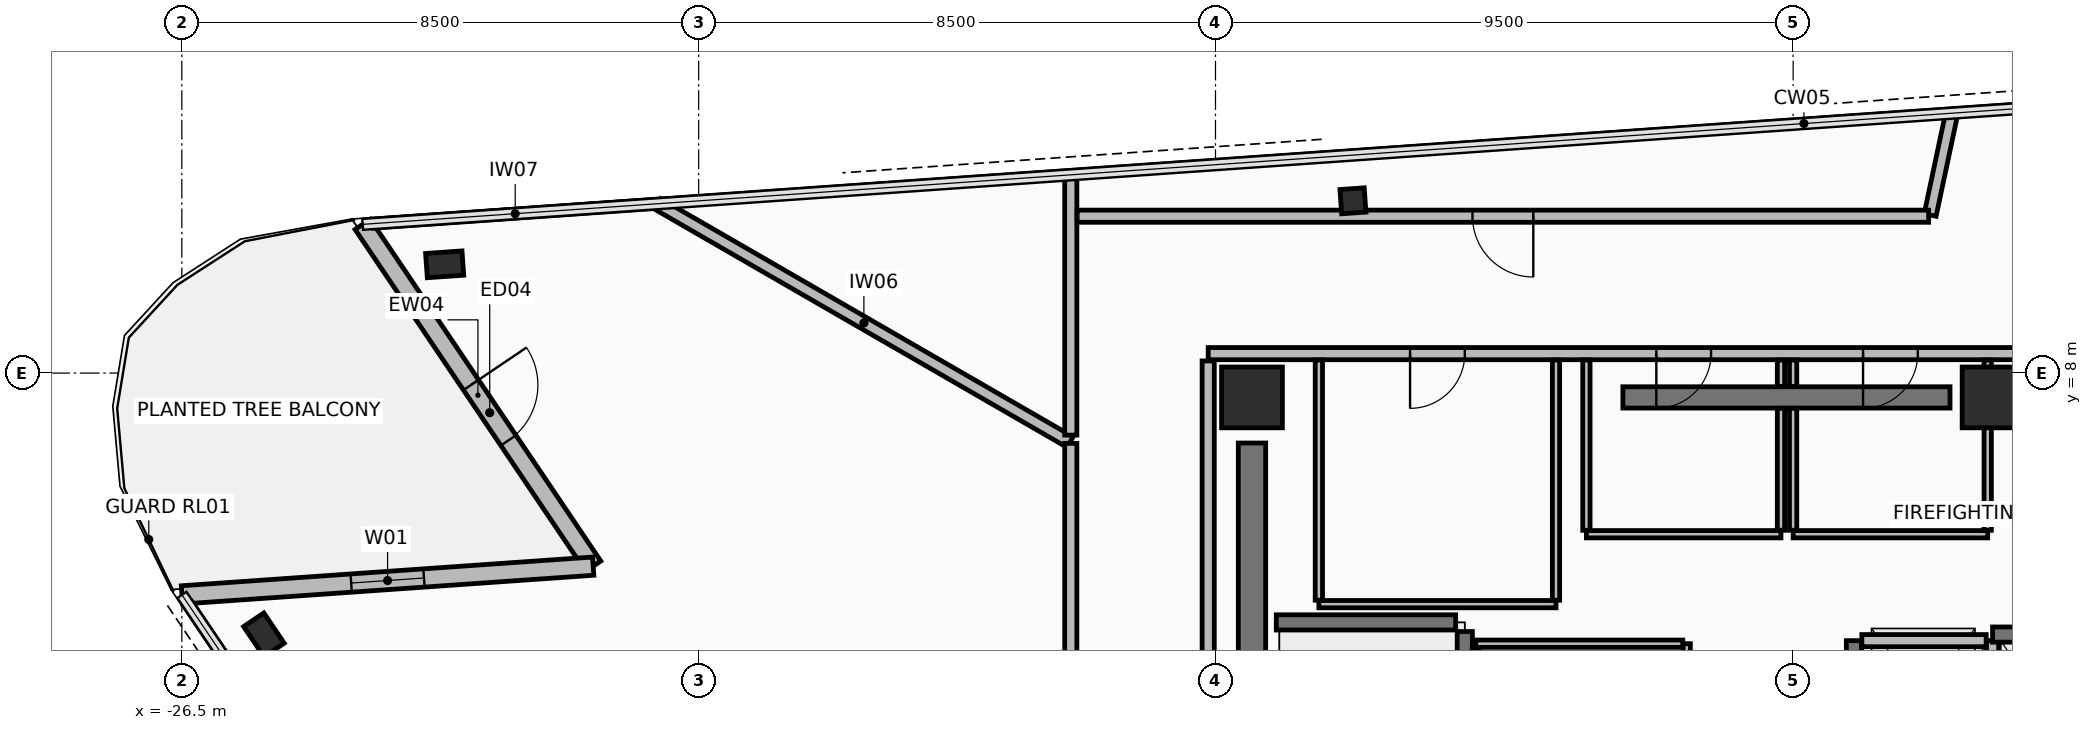
"""IFC4 building model, lengths in metres.
Left out: names, types, materials, properties, quantities, classifications, styles, units other than length and angle.
Written with IfcOpenShell. Run it as: python <this file> out.ifc"""

import sys

from ifc_helpers import new_model, si_unit, direction, frame, frame_2d, origin, origin_2d, place, context, subcontext, project, spatial, rectangle, hollow_rectangle, extrude, element, fill, save


model = new_model("IFC4")
c1 = context("Model", 3, precision=1e-05, world=origin(), true_north=direction((0.0, 1.0)))
c2 = subcontext(c1, "Body", "Model", "MODEL_VIEW")
j1 = project(units=[si_unit("LENGTHUNIT", "METRE"), si_unit("PLANEANGLEUNIT", "RADIAN")], contexts=[c1])
p1 = place(None, origin())
s1 = spatial("IfcSite", under=j1, at=p1, CompositionType="ELEMENT")
p2 = place(p1, origin())
s2 = spatial("IfcBuilding", under=s1, at=p2, CompositionType="ELEMENT")
p3 = place(p2, frame((0.0, 0.0, 271.4)))
s3 = spatial("IfcBuildingStorey", under=s2, at=p3, CompositionType="ELEMENT", Elevation=271.4)
for number, where, z_axis, x_axis in (
    (1, (3.28, 7.6, 0.0), (0.0, 0.0, 1.0), (1.0, 0.0, 0.0)),
    (2, (-8.9, 7.6, 0.0), (0.0, 0.0, 1.0), (1.0, 0.0, 0.0)),
):
    element("IfcColumn", number, at=place(p3, frame(where, z_axis=z_axis, x_axis=x_axis)), inside=s3, PredefinedType="COLUMN", context=c2, shape_type="SweptSolid", body=[
        extrude(rectangle(XDim=1.0, YDim=1.0, at=origin_2d()), origin(), (0.0, 0.0, 1.0), 3.6),
    ])
p4 = place(p3, frame((-25.15, 3.695, 0.0), z_axis=(0.0, 0.0, 1.0), x_axis=(-0.559192903471, 0.829037572555, 0.0)))
e3 = element("IfcColumn", 3, at=p4, inside=s3, PredefinedType="COLUMN", context=c2, shape_type="SweptSolid", body=[
    extrude(hollow_rectangle(XDim=0.4, YDim=0.6, WallThickness=0.03, at=origin_2d()), origin(), (0.0, 0.0, 1.0), 3.6),
])
p5 = place(p3, frame((-7.24, 10.833, 0.0), z_axis=(0.0, 0.0, 1.0), x_axis=(0.99756392851, 0.069758214822, 0.0)))
e4 = element("IfcColumn", 4, at=p5, inside=s3, PredefinedType="COLUMN", context=c2, shape_type="SweptSolid", body=[
    extrude(hollow_rectangle(XDim=0.4, YDim=0.4, WallThickness=0.025, at=origin_2d()), origin(), (0.0, 0.0, 1.0), 3.6),
])
p6 = place(p3, frame((-22.177, 9.789, 0.0), z_axis=(0.0, 0.0, 1.0), x_axis=(0.99756392851, 0.069758214822, 0.0)))
e5 = element("IfcColumn", 5, at=p6, inside=s3, PredefinedType="COLUMN", context=c2, shape_type="SweptSolid", body=[
    extrude(hollow_rectangle(XDim=0.4, YDim=0.6, WallThickness=0.03, at=origin_2d()), origin(), (0.0, 0.0, 1.0), 3.6),
])
p7 = place(p3, frame((-23.526, 10.446, 0.0), z_axis=(0.0, 0.0, 1.0), x_axis=(0.559187716425, -0.829041071238, 0.0)))
e6 = element("IfcWall", 6, at=p7, inside=s3, PredefinedType="STANDARD", context=c2, shape_type="SweptSolid", body=[
    extrude(rectangle(XDim=6.78, YDim=0.3, at=frame_2d((3.39, 0.0))), origin(), (0.0, 0.0, 1.0), 2.765),
])
p8 = place(p7, frame((3.186, 0.0, 0.0)))
e7 = element("IfcOpeningElement", 7, at=p8, cuts=e6, PredefinedType="OPENING", context=c2, shape_type="SweptSolid", body=[
    extrude(rectangle(XDim=1.1, YDim=2.2, at=frame_2d((0.55, 1.1))), frame((0.0, 0.16, 0.0), z_axis=(0.0, -1.0, 0.0), x_axis=(1.0, 0.0, 0.0)), (0.0, 0.0, 1.0), 0.32),
])
p9 = place(p3, frame((-19.735, 4.825, 0.0), z_axis=(0.0, 0.0, 1.0), x_axis=(-0.997564507468, -0.06974993506, 0.0)))
e8 = element("IfcWall", 8, at=p9, inside=s3, PredefinedType="STANDARD", context=c2, shape_type="SweptSolid", body=[
    extrude(rectangle(XDim=6.78, YDim=0.3, at=frame_2d((3.39, 0.0))), origin(), (0.0, 0.0, 1.0), 2.765),
])
p10 = place(p9, frame((2.79, 0.0, 0.485)))
e9 = element("IfcOpeningElement", 9, at=p10, cuts=e8, PredefinedType="OPENING", context=c2, shape_type="SweptSolid", body=[
    extrude(rectangle(XDim=1.2, YDim=2.1, at=frame_2d((0.6, 1.05))), frame((0.0, 0.16, 0.0), z_axis=(0.0, -1.0, 0.0), x_axis=(1.0, 0.0, 0.0)), (0.0, 0.0, 1.0), 0.32),
])
p11 = place(p3, frame((-2.8, 7.6, 0.0), z_axis=(0.0, 0.0, 1.0), x_axis=(1.0, 0.0, 0.0)))
e10 = element("IfcWall", 10, at=p11, inside=s3, PredefinedType="SHEAR", context=c2, shape_type="SweptSolid", body=[
    extrude(rectangle(XDim=5.38, YDim=0.35, at=frame_2d((2.69, 0.0))), origin(), (0.0, 0.0, 1.0), 3.42),
])
p12 = place(p3, frame((-8.9, -3.85, 0.0), z_axis=(0.0, 0.0, 1.0), x_axis=(0.0, 1.0, 0.0)))
e11 = element("IfcWall", 11, at=p12, inside=s3, PredefinedType="SHEAR", context=c2, shape_type="SweptSolid", body=[
    extrude(rectangle(XDim=10.7, YDim=0.45, at=frame_2d((5.35, 0.0))), origin(), (0.0, 0.0, 1.0), 3.42),
])
p13 = place(p3, frame((9.62, 8.32, 0.0), z_axis=(0.0, 0.0, 1.0), x_axis=(-1.0, 0.0, 0.0)))
e12 = element("IfcWall", 12, at=p13, inside=s3, PredefinedType="PARTITIONING", context=c2, shape_type="SweptSolid", body=[
    extrude(rectangle(XDim=19.24, YDim=0.2, at=frame_2d((9.62, 0.0))), origin(), (0.0, 0.0, 1.0), 2.915),
])
p14 = place(p13, frame((10.97, 0.0, 0.0)))
e13 = element("IfcOpeningElement", 13, at=p14, cuts=e12, PredefinedType="OPENING", context=c2, shape_type="SweptSolid", body=[
    extrude(rectangle(XDim=0.9, YDim=2.1, at=frame_2d((0.45, 1.05))), frame((0.0, 0.11, 0.0), z_axis=(0.0, -1.0, 0.0), x_axis=(1.0, 0.0, 0.0)), (0.0, 0.0, 1.0), 0.22),
])
p15 = place(p13, frame((7.57, 0.0, 0.0)))
e14 = element("IfcOpeningElement", 14, at=p15, cuts=e12, PredefinedType="OPENING", context=c2, shape_type="SweptSolid", body=[
    extrude(rectangle(XDim=0.9, YDim=2.1, at=frame_2d((0.45, 1.05))), frame((0.0, 0.11, 0.0), z_axis=(0.0, -1.0, 0.0), x_axis=(1.0, 0.0, 0.0)), (0.0, 0.0, 1.0), 0.22),
])
p16 = place(p13, frame((15.02, 0.0, 0.0)))
e15 = element("IfcOpeningElement", 15, at=p16, cuts=e12, PredefinedType="OPENING", context=c2, shape_type="SweptSolid", body=[
    extrude(rectangle(XDim=0.9, YDim=2.1, at=frame_2d((0.45, 1.05))), frame((0.0, 0.11, 0.0), z_axis=(0.0, -1.0, 0.0), x_axis=(1.0, 0.0, 0.0)), (0.0, 0.0, 1.0), 0.22),
])
p17 = place(p3, frame((-9.62, 8.2, 0.0), z_axis=(0.0, 0.0, 1.0), x_axis=(0.0, -1.0, 0.0)))
e16 = element("IfcWall", 16, at=p17, inside=s3, PredefinedType="PARTITIONING", context=c2, shape_type="SweptSolid", body=[
    extrude(rectangle(XDim=16.4, YDim=0.2, at=frame_2d((8.2, 0.0))), origin(), (0.0, 0.0, 1.0), 2.765),
])
p18 = place(p17, frame((12.65, 0.0, 0.0)))
e17 = element("IfcOpeningElement", 17, at=p18, cuts=e16, PredefinedType="OPENING", context=c2, shape_type="SweptSolid", body=[
    extrude(rectangle(XDim=1.1, YDim=2.15, at=frame_2d((0.55, 1.075))), frame((0.0, 0.11, 0.0), z_axis=(0.0, -1.0, 0.0), x_axis=(1.0, 0.0, 0.0)), (0.0, 0.0, 1.0), 0.22),
])
p19 = place(p3, frame((-5.4, -3.55, 0.0), z_axis=(0.0, 0.0, 1.0), x_axis=(0.0, 1.0, 0.0)))
e18 = element("IfcWall", 18, at=p19, inside=s3, PredefinedType="SHEAR", context=c2, shape_type="SweptSolid", body=[
    extrude(rectangle(XDim=7.3, YDim=0.25, at=frame_2d((3.65, 0.0))), origin(), (0.0, 0.0, 1.0), 3.42),
])
p20 = place(p3, frame((-8.5, 3.9, 0.0), z_axis=(0.0, 0.0, 1.0), x_axis=(1.0, 0.0, 0.0)))
e19 = element("IfcWall", 19, at=p20, inside=s3, PredefinedType="SHEAR", context=c2, shape_type="SweptSolid", body=[
    extrude(rectangle(XDim=2.95, YDim=0.25, at=frame_2d((1.475, 0.0))), origin(), (0.0, 0.0, 1.0), 3.42),
])
p21 = place(p3, frame((1.0, 1.8, 0.0), z_axis=(0.0, 0.0, 1.0), x_axis=(0.0, 1.0, 0.0)))
e20 = element("IfcWall", 20, at=p21, inside=s3, PredefinedType="SHEAR", context=c2, shape_type="SweptSolid", body=[
    extrude(rectangle(XDim=1.8, YDim=0.25, at=frame_2d((0.9, 0.0))), origin(), (0.0, 0.0, 1.0), 3.42),
])
p22 = place(p21, frame((0.35, 0.0, 0.0)))
e21 = element("IfcOpeningElement", 21, at=p22, cuts=e20, PredefinedType="OPENING", context=c2, shape_type="SweptSolid", body=[
    extrude(rectangle(XDim=1.1, YDim=2.2, at=frame_2d((0.55, 1.1))), frame((0.0, 0.135, 0.0), z_axis=(0.0, -1.0, 0.0), x_axis=(1.0, 0.0, 0.0)), (0.0, 0.0, 1.0), 0.27),
])
p23 = place(p3, frame((3.28, 1.8, 0.0), z_axis=(0.0, 0.0, 1.0), x_axis=(0.0, 1.0, 0.0)))
e22 = element("IfcWall", 22, at=p23, inside=s3, PredefinedType="PARTITIONING", context=c2, shape_type="SweptSolid", body=[
    extrude(rectangle(XDim=1.8, YDim=0.2, at=frame_2d((0.9, 0.0))), origin(), (0.0, 0.0, 1.0), 3.42),
])
p24 = place(p3, frame((1.13, 3.6, 0.0), z_axis=(0.0, 0.0, 1.0), x_axis=(1.0, 0.0, 0.0)))
e23 = element("IfcWall", 23, at=p24, inside=s3, PredefinedType="PARTITIONING", context=c2, shape_type="SweptSolid", body=[
    extrude(rectangle(XDim=2.045, YDim=0.2, at=frame_2d((1.022, 0.0))), origin(), (0.0, 0.0, 1.0), 2.715),
])
p25 = place(p3, frame((3.28, 3.7, 0.0), z_axis=(0.0, 0.0, 1.0), x_axis=(1.0, 0.0, 0.0)))
e24 = element("IfcWall", 24, at=p25, inside=s3, PredefinedType="SHEAR", context=c2, shape_type="SweptSolid", body=[
    extrude(rectangle(XDim=2.07, YDim=0.25, at=frame_2d((1.035, 0.0))), origin(), (0.0, 0.0, 1.0), 3.42),
])
p26 = place(p25, frame((0.435, 0.0, 0.0)))
e25 = element("IfcOpeningElement", 25, at=p26, cuts=e24, PredefinedType="OPENING", context=c2, shape_type="SweptSolid", body=[
    extrude(rectangle(XDim=1.2, YDim=2.2, at=frame_2d((0.6, 1.1))), frame((0.0, 0.135, 0.0), z_axis=(0.0, -1.0, 0.0), x_axis=(1.0, 0.0, 0.0)), (0.0, 0.0, 1.0), 0.27),
])
p27 = place(p3, frame((-1.75, 1.585, 0.0), z_axis=(0.0, 0.0, 1.0), x_axis=(0.0, 1.0, 0.0)))
e26 = element("IfcWall", 26, at=p27, inside=s3, PredefinedType="PARTITIONING", context=c2, shape_type="SweptSolid", body=[
    extrude(rectangle(XDim=1.965, YDim=0.12, at=frame_2d((0.982, 0.0))), origin(), (0.0, 0.0, 1.0), 3.42),
])
p28 = place(p27, frame((0.557, 0.0, 0.0)))
e27 = element("IfcOpeningElement", 27, at=p28, cuts=e26, PredefinedType="OPENING", context=c2, shape_type="SweptSolid", body=[
    extrude(rectangle(XDim=0.85, YDim=2.1, at=frame_2d((0.425, 1.05))), frame((0.0, 0.07, 0.0), z_axis=(0.0, -1.0, 0.0), x_axis=(1.0, 0.0, 0.0)), (0.0, 0.0, 1.0), 0.14),
])
p29 = place(p3, frame((-1.815, 3.55, 0.0), z_axis=(0.0, 0.0, 1.0), x_axis=(-1.0, 0.0, 0.0)))
e28 = element("IfcWall", 28, at=p29, inside=s3, PredefinedType="PARTITIONING", context=c2, shape_type="SweptSolid", body=[
    extrude(rectangle(XDim=3.405, YDim=0.12, at=frame_2d((1.703, 0.0))), origin(), (0.0, 0.0, 1.0), 3.42),
])
p30 = place(p3, frame((-5.22, 3.485, 0.0), z_axis=(0.0, 0.0, 1.0), x_axis=(0.0, -1.0, 0.0)))
e29 = element("IfcWall", 29, at=p30, inside=s3, PredefinedType="PARTITIONING", context=c2, shape_type="SweptSolid", body=[
    extrude(rectangle(XDim=1.9, YDim=0.12, at=frame_2d((0.95, 0.0))), origin(), (0.0, 0.0, 1.0), 3.42),
])
p31 = place(p3, frame((-3.4, 5.35, 0.0), z_axis=(0.0, 0.0, 1.0), x_axis=(1.0, 0.0, 0.0)))
e30 = element("IfcWall", 30, at=p31, inside=s3, PredefinedType="PARTITIONING", context=c2, shape_type="SweptSolid", body=[
    extrude(rectangle(XDim=3.2, YDim=0.12, at=frame_2d((1.6, 0.0))), origin(), (0.0, 0.0, 1.0), 3.42),
])
p32 = place(p3, frame((-0.2, 5.415, 0.0), z_axis=(0.0, 0.0, 1.0), x_axis=(0.0, 1.0, 0.0)))
e31 = element("IfcWall", 31, at=p32, inside=s3, PredefinedType="PARTITIONING", context=c2, shape_type="SweptSolid", body=[
    extrude(rectangle(XDim=2.005, YDim=0.12, at=frame_2d((1.002, 0.0))), origin(), (0.0, 0.0, 1.0), 2.715),
])
p33 = place(p3, frame((-0.2, 7.78, 0.0), z_axis=(0.0, 0.0, 1.0), x_axis=(0.0, 1.0, 0.0)))
e32 = element("IfcWall", 32, at=p33, inside=s3, PredefinedType="PARTITIONING", context=c2, shape_type="SweptSolid", body=[
    extrude(rectangle(XDim=0.435, YDim=0.12, at=frame_2d((0.218, 0.0))), origin(), (0.0, 0.0, 1.0), 2.715),
])
p34 = place(p3, frame((-3.4, 8.215, 0.0), z_axis=(0.0, 0.0, 1.0), x_axis=(0.0, -1.0, 0.0)))
e33 = element("IfcWall", 33, at=p34, inside=s3, PredefinedType="PARTITIONING", context=c2, shape_type="SweptSolid", body=[
    extrude(rectangle(XDim=2.8, YDim=0.12, at=frame_2d((1.4, 0.0))), origin(), (0.0, 0.0, 1.0), 2.715),
])
p35 = place(p3, frame((0.0, 5.35, 0.0), z_axis=(0.0, 0.0, 1.0), x_axis=(1.0, 0.0, 0.0)))
e34 = element("IfcWall", 34, at=p35, inside=s3, PredefinedType="PARTITIONING", context=c2, shape_type="SweptSolid", body=[
    extrude(rectangle(XDim=3.2, YDim=0.12, at=frame_2d((1.6, 0.0))), origin(), (0.0, 0.0, 1.0), 2.715),
])
p36 = place(p3, frame((3.2, 5.415, 0.0), z_axis=(0.0, 0.0, 1.0), x_axis=(0.0, 1.0, 0.0)))
e35 = element("IfcWall", 35, at=p36, inside=s3, PredefinedType="PARTITIONING", context=c2, shape_type="SweptSolid", body=[
    extrude(rectangle(XDim=2.8, YDim=0.12, at=frame_2d((1.4, 0.0))), origin(), (0.0, 0.0, 1.0), 2.715),
])
p37 = place(p3, frame((0.0, 8.215, 0.0), z_axis=(0.0, 0.0, 1.0), x_axis=(0.0, -1.0, 0.0)))
e36 = element("IfcWall", 36, at=p37, inside=s3, PredefinedType="PARTITIONING", context=c2, shape_type="SweptSolid", body=[
    extrude(rectangle(XDim=0.435, YDim=0.12, at=frame_2d((0.218, 0.0))), origin(), (0.0, 0.0, 1.0), 2.715),
])
p38 = place(p3, frame((0.0, 7.42, 0.0), z_axis=(0.0, 0.0, 1.0), x_axis=(0.0, -1.0, 0.0)))
e37 = element("IfcWall", 37, at=p38, inside=s3, PredefinedType="PARTITIONING", context=c2, shape_type="SweptSolid", body=[
    extrude(rectangle(XDim=2.005, YDim=0.12, at=frame_2d((1.002, 0.0))), origin(), (0.0, 0.0, 1.0), 2.715),
])
p39 = place(p3, frame((-7.8, 4.2, 0.0), z_axis=(0.0, 0.0, 1.0), x_axis=(1.0, 0.0, 0.0)))
e38 = element("IfcWall", 38, at=p39, inside=s3, PredefinedType="PARTITIONING", context=c2, shape_type="SweptSolid", body=[
    extrude(rectangle(XDim=3.9, YDim=0.12, at=frame_2d((1.95, 0.0))), origin(), (0.0, 0.0, 1.0), 3.42),
])
for number, where, z_axis, x_axis in (
    (39, (-3.9, 4.265, 0.0), (0.0, 0.0, 1.0), (0.0, 1.0, 0.0)),
    (40, (-7.8, 8.215, 0.0), (0.0, 0.0, 1.0), (0.0, -1.0, 0.0)),
):
    element("IfcWall", number, at=place(p3, frame(where, z_axis=z_axis, x_axis=x_axis)), inside=s3, PredefinedType="PARTITIONING", context=c2, shape_type="SweptSolid", body=[
        extrude(rectangle(XDim=3.95, YDim=0.12, at=frame_2d((1.975, 0.0))), origin(), (0.0, 0.0, 1.0), 2.715),
    ])
p40 = place(p3, frame((-23.347, 10.458, 0.0), z_axis=(0.0, 0.0, 1.0), x_axis=(0.997566316113, 0.069724062962, 0.0)))
e41 = element("IfcWall", 41, at=p40, inside=s3, PredefinedType="PARTITIONING", context=c2, shape_type="SweptSolid", body=[
    extrude(rectangle(XDim=4.671, YDim=0.15, at=frame_2d((2.335, 0.0))), origin(), (0.0, 0.0, 1.0), 3.42),
])
p41 = place(p3, frame((-18.673, 10.781, 0.0), z_axis=(0.0, 0.0, 1.0), x_axis=(0.866029810455, -0.499992367345, 0.0)))
e42 = element("IfcWall", 42, at=p41, inside=s3, PredefinedType="PARTITIONING", context=c2, shape_type="SweptSolid", body=[
    extrude(rectangle(XDim=7.83, YDim=0.2, at=frame_2d((3.915, 0.0))), origin(), (0.0, 0.0, 1.0), 2.765),
])
p42 = place(p3, frame((-11.88, 6.844, 0.0), z_axis=(0.0, 0.0, 1.0), x_axis=(0.0, -1.0, 0.0)))
e43 = element("IfcWall", 43, at=p42, inside=s3, PredefinedType="PARTITIONING", context=c2, shape_type="SweptSolid", body=[
    extrude(rectangle(XDim=17.424, YDim=0.2, at=frame_2d((8.712, 0.0))), origin(), (0.0, 0.0, 1.0), 2.915),
])
p43 = place(p42, frame((8.287, 0.0, 0.0)))
e44 = element("IfcOpeningElement", 44, at=p43, cuts=e43, PredefinedType="OPENING", context=c2, shape_type="SweptSolid", body=[
    extrude(rectangle(XDim=0.85, YDim=2.1, at=frame_2d((0.425, 1.05))), frame((0.0, 0.11, 0.0), z_axis=(0.0, -1.0, 0.0), x_axis=(1.0, 0.0, 0.0)), (0.0, 0.0, 1.0), 0.22),
])
p44 = place(p3, frame((-14.676, -13.176, 0.0), z_axis=(0.0, 0.0, 1.0), x_axis=(-0.559188394736, 0.829040613717, 0.0)))
e45 = element("IfcWall", 45, at=p44, inside=s3, PredefinedType="PARTITIONING", context=c2, shape_type="SweptSolid", body=[
    extrude(rectangle(XDim=20.963, YDim=0.15, at=frame_2d((10.482, 0.0))), origin(), (0.0, 0.0, 1.0), 3.42),
])
p45 = place(p3, frame((-11.88, 11.26, 0.0), z_axis=(0.0, 0.0, 1.0), x_axis=(0.0, -1.0, 0.0)))
e46 = element("IfcWall", 46, at=p45, inside=s3, PredefinedType="PARTITIONING", context=c2, shape_type="SweptSolid", body=[
    extrude(rectangle(XDim=4.281, YDim=0.2, at=frame_2d((2.14, 0.0))), origin(), (0.0, 0.0, 1.0), 2.765),
])
p46 = place(p3, frame((2.609, 12.274, 0.0), z_axis=(0.0, 0.0, 1.0), x_axis=(-0.207872406536, -0.978155950041, 0.0)))
e47 = element("IfcWall", 47, at=p46, inside=s3, PredefinedType="PARTITIONING", context=c2, shape_type="SweptSolid", body=[
    extrude(rectangle(XDim=1.711, YDim=0.2, at=frame_2d((0.855, 0.0))), origin(), (0.0, 0.0, 1.0), 2.765),
])
p47 = place(p3, frame((2.229, 10.58, 0.0), z_axis=(0.0, 0.0, 1.0), x_axis=(-1.0, 0.0, 0.0)))
e48 = element("IfcWall", 48, at=p47, inside=s3, PredefinedType="PARTITIONING", context=c2, shape_type="SweptSolid", body=[
    extrude(rectangle(XDim=14.003, YDim=0.2, at=frame_2d((7.002, 0.0))), origin(), (0.0, 0.0, 1.0), 2.765),
])
p48 = place(p47, frame((6.502, 0.0, 0.0)))
e49 = element("IfcOpeningElement", 49, at=p48, cuts=e48, PredefinedType="OPENING", context=c2, shape_type="SweptSolid", body=[
    extrude(rectangle(XDim=1.0, YDim=2.15, at=frame_2d((0.5, 1.075))), frame((0.0, 0.11, 0.0), z_axis=(0.0, -1.0, 0.0), x_axis=(1.0, 0.0, 0.0)), (0.0, 0.0, 1.0), 0.22),
])
p49 = place(p8, origin())
e50 = element("IfcDoor", 50, at=p49, inside=s3, OperationType="SINGLE_SWING_LEFT", PredefinedType="DOOR", context=c2, shape_type="SweptSolid", body=[
    extrude(rectangle(XDim=1.1, YDim=2.2, at=frame_2d((0.55, 1.1))), frame((0.0, 0.025, 0.0), z_axis=(0.0, -1.0, 0.0), x_axis=(1.0, 0.0, 0.0)), (0.0, 0.0, 1.0), 0.05),
])
fill(e7, e50)
p50 = place(p10, origin())
e51 = element("IfcWindow", 51, at=p50, inside=s3, PartitioningType="SINGLE_PANEL", PredefinedType="WINDOW", context=c2, shape_type="SweptSolid", body=[
    extrude(rectangle(XDim=1.2, YDim=2.1, at=frame_2d((0.6, 1.05))), frame((0.0, 0.03, 0.0), z_axis=(0.0, -1.0, 0.0), x_axis=(1.0, 0.0, 0.0)), (0.0, 0.0, 1.0), 0.06),
])
fill(e9, e51)
p51 = place(p14, frame((0.9, 0.0, 0.0), z_axis=(0.0, 0.0, 1.0), x_axis=(-1.0, 0.0, 0.0)))
e52 = element("IfcDoor", 52, at=p51, inside=s3, OperationType="SINGLE_SWING_LEFT", PredefinedType="DOOR", context=c2, shape_type="SweptSolid", body=[
    extrude(rectangle(XDim=0.9, YDim=2.1, at=frame_2d((0.45, 1.05))), frame((0.0, 0.025, 0.0), z_axis=(0.0, -1.0, 0.0), x_axis=(1.0, 0.0, 0.0)), (0.0, 0.0, 1.0), 0.05),
])
fill(e13, e52)
p52 = place(p15, frame((0.9, 0.0, 0.0), z_axis=(0.0, 0.0, 1.0), x_axis=(-1.0, 0.0, 0.0)))
e53 = element("IfcDoor", 53, at=p52, inside=s3, OperationType="SINGLE_SWING_LEFT", PredefinedType="DOOR", context=c2, shape_type="SweptSolid", body=[
    extrude(rectangle(XDim=0.9, YDim=2.1, at=frame_2d((0.45, 1.05))), frame((0.0, 0.025, 0.0), z_axis=(0.0, -1.0, 0.0), x_axis=(1.0, 0.0, 0.0)), (0.0, 0.0, 1.0), 0.05),
])
fill(e14, e53)
p53 = place(p16, frame((0.9, 0.0, 0.0), z_axis=(0.0, 0.0, 1.0), x_axis=(-1.0, 0.0, 0.0)))
e54 = element("IfcDoor", 54, at=p53, inside=s3, OperationType="SINGLE_SWING_LEFT", PredefinedType="DOOR", context=c2, shape_type="SweptSolid", body=[
    extrude(rectangle(XDim=0.9, YDim=2.1, at=frame_2d((0.45, 1.05))), frame((0.0, 0.025, 0.0), z_axis=(0.0, -1.0, 0.0), x_axis=(1.0, 0.0, 0.0)), (0.0, 0.0, 1.0), 0.05),
])
fill(e15, e54)
p54 = place(p48, origin())
e55 = element("IfcDoor", 55, at=p54, inside=s3, OperationType="SINGLE_SWING_RIGHT", PredefinedType="DOOR", context=c2, shape_type="SweptSolid", body=[
    extrude(rectangle(XDim=1.0, YDim=2.15, at=frame_2d((0.5, 1.075))), frame((0.0, 0.025, 0.0), z_axis=(0.0, -1.0, 0.0), x_axis=(1.0, 0.0, 0.0)), (0.0, 0.0, 1.0), 0.05),
])
fill(e49, e55)
save(model, sys.argv[1])
